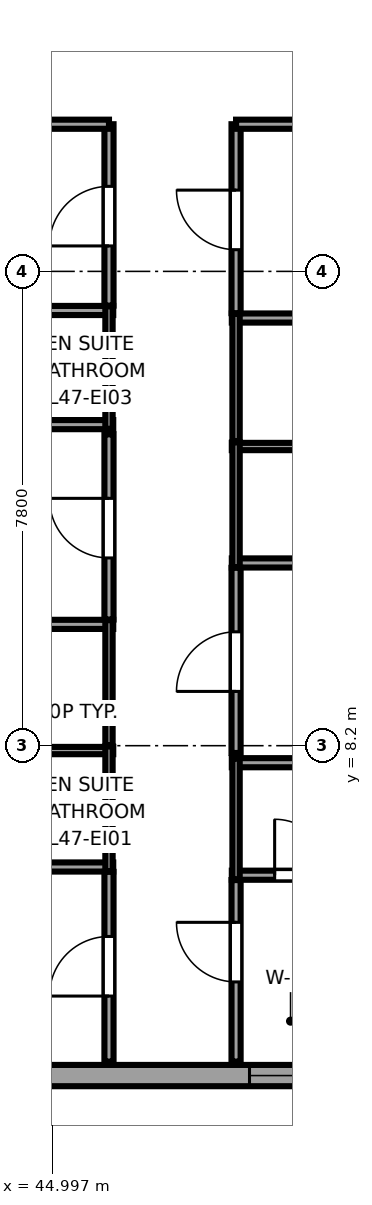
"""IFC4 building model, lengths in metres.
Left out: names, types, materials, properties, quantities, classifications, styles, units other than length and angle.
Written with IfcOpenShell. Run it as: python <this file> out.ifc"""

import sys

from ifc_helpers import new_model, si_unit, direction, frame, frame_2d, origin, place, context, subcontext, project, spatial, rectangle, extrude, source, transform, mapped, element, fill, save


model = new_model("IFC4")
c1 = context("Model", 3, precision=1e-05, world=origin(), true_north=direction((0.0, 1.0)))
c2 = subcontext(c1, "Body", "Model", "MODEL_VIEW")
j1 = project(units=[si_unit("LENGTHUNIT", "METRE"), si_unit("PLANEANGLEUNIT", "RADIAN")], contexts=[c1])
p1 = place(None, origin())
s1 = spatial("IfcSite", under=j1, at=p1, CompositionType="ELEMENT")
p2 = place(p1, origin())
s2 = spatial("IfcBuilding", under=s1, at=p2, CompositionType="ELEMENT")
p3 = place(p2, frame((0.0, 0.0, 179.0)))
s3 = spatial("IfcBuildingStorey", under=s2, at=p3, CompositionType="ELEMENT", Elevation=179.0)
p4 = place(p3, frame((34.375, 2.775, 0.0), z_axis=(0.0, 0.0, 1.0), x_axis=(1.0, 0.0, 0.0)))
e1 = element("IfcWall", 1, at=p4, inside=s3, PredefinedType="SOLIDWALL", context=c2, shape_type="SweptSolid", body=[
    extrude(rectangle(XDim=15.608, YDim=0.35, at=frame_2d((7.804, 0.0))), origin(), (0.0, 0.0, 1.0), 3.25),
])
p5 = place(p4, frame((1.801, 0.0, 0.68)))
e2 = element("IfcOpeningElement", 2, at=p5, cuts=e1, PredefinedType="OPENING", context=c2, shape_type="SweptSolid", body=[
    extrude(rectangle(XDim=2.4, YDim=1.9, at=frame_2d((1.2, 0.95))), frame((0.0, 0.185, 0.0), z_axis=(0.0, -1.0, 0.0), x_axis=(1.0, 0.0, 0.0)), (0.0, 0.0, 1.0), 0.37),
])
p6 = place(p4, frame((13.866, 0.0, 0.58)))
e3 = element("IfcOpeningElement", 3, at=p6, cuts=e1, PredefinedType="OPENING", context=c2, shape_type="SweptSolid", body=[
    extrude(rectangle(XDim=1.35, YDim=1.6, at=frame_2d((0.675, 0.8))), frame((0.0, 0.185, 0.0), z_axis=(0.0, -1.0, 0.0), x_axis=(1.0, 0.0, 0.0)), (0.0, 0.0, 1.0), 0.37),
])
p7 = place(p3, frame((43.41, 6.205, 0.0), z_axis=(0.0, 0.0, 1.0), x_axis=(1.0, 0.0, 0.0)))
e4 = element("IfcWall", 4, at=p7, inside=s3, PredefinedType="PARTITIONING", context=c2, shape_type="SweptSolid", body=[
    extrude(rectangle(XDim=2.59, YDim=0.15, at=frame_2d((1.295, 0.0))), origin(), (0.0, 0.0, 1.0), 3.25),
])
p8 = place(p3, frame((43.41, 8.12, 0.0), z_axis=(0.0, 0.0, 1.0), x_axis=(1.0, 0.0, 0.0)))
e5 = element("IfcWall", 5, at=p8, inside=s3, PredefinedType="PLUMBINGWALL", context=c2, shape_type="SweptSolid", body=[
    extrude(rectangle(XDim=2.59, YDim=0.12, at=frame_2d((1.295, 0.0))), origin(), (0.0, 0.0, 1.0), 2.638),
])
p9 = place(p3, frame((45.93, 6.135, 0.0), z_axis=(0.0, 0.0, 1.0), x_axis=(0.0, 1.0, 0.0)))
e6 = element("IfcWall", 6, at=p9, inside=s3, PredefinedType="PLUMBINGWALL", context=c2, shape_type="SweptSolid", body=[
    extrude(rectangle(XDim=2.055, YDim=0.12, at=frame_2d((1.027, 0.0))), origin(), (0.0, 0.0, 1.0), 3.25),
])
p10 = place(p3, frame((43.41, 10.195, 0.0), z_axis=(0.0, 0.0, 1.0), x_axis=(1.0, 0.0, 0.0)))
e7 = element("IfcWall", 7, at=p10, inside=s3, PredefinedType="PARTITIONING", context=c2, shape_type="SweptSolid", body=[
    extrude(rectangle(XDim=2.59, YDim=0.15, at=frame_2d((1.295, 0.0))), origin(), (0.0, 0.0, 1.0), 3.25),
])
p11 = place(p3, frame((45.93, 8.21, 0.0), z_axis=(0.0, 0.0, 1.0), x_axis=(0.0, 1.0, 0.0)))
e8 = element("IfcWall", 8, at=p11, inside=s3, PredefinedType="PLUMBINGWALL", context=c2, shape_type="SweptSolid", body=[
    extrude(rectangle(XDim=2.055, YDim=0.12, at=frame_2d((1.027, 0.0))), origin(), (0.0, 0.0, 1.0), 3.25),
])
p12 = place(p3, frame((34.65, 13.48, 0.0), z_axis=(0.0, 0.0, 1.0), x_axis=(1.0, 0.0, 0.0)))
e9 = element("IfcWall", 9, at=p12, inside=s3, PredefinedType="PARTITIONING", context=c2, shape_type="SweptSolid", body=[
    extrude(rectangle(XDim=11.35, YDim=0.15, at=frame_2d((5.675, 0.0))), origin(), (0.0, 0.0, 1.0), 3.25),
])
p13 = place(p3, frame((43.41, 15.357, 0.0), z_axis=(0.0, 0.0, 1.0), x_axis=(1.0, 0.0, 0.0)))
e10 = element("IfcWall", 10, at=p13, inside=s3, PredefinedType="PARTITIONING", context=c2, shape_type="SweptSolid", body=[
    extrude(rectangle(XDim=2.59, YDim=0.15, at=frame_2d((1.295, 0.0))), origin(), (0.0, 0.0, 1.0), 3.25),
])
p14 = place(p3, frame((45.93, 13.41, 0.0), z_axis=(0.0, 0.0, 1.0), x_axis=(0.0, 1.0, 0.0)))
e11 = element("IfcWall", 11, at=p14, inside=s3, PredefinedType="PLUMBINGWALL", context=c2, shape_type="SweptSolid", body=[
    extrude(rectangle(XDim=2.017, YDim=0.12, at=frame_2d((1.009, 0.0))), origin(), (0.0, 0.0, 1.0), 3.25),
])
p15 = place(p3, frame((47.95, 6.07, 0.0), z_axis=(0.0, 0.0, 1.0), x_axis=(1.0, 0.0, 0.0)))
e12 = element("IfcWall", 12, at=p15, inside=s3, PredefinedType="PARTITIONING", context=c2, shape_type="SweptSolid", body=[
    extrude(rectangle(XDim=2.329, YDim=0.15, at=frame_2d((1.165, 0.0))), origin(), (0.0, 0.0, 1.0), 3.25),
])
p16 = place(p15, frame((0.705, 0.0, 0.0)))
e13 = element("IfcOpeningElement", 13, at=p16, cuts=e12, PredefinedType="OPENING", context=c2, shape_type="SweptSolid", body=[
    extrude(rectangle(XDim=0.92, YDim=2.01, at=frame_2d((0.46, 1.005))), frame((0.0, 0.085, 0.0), z_axis=(0.0, -1.0, 0.0), x_axis=(1.0, 0.0, 0.0)), (0.0, 0.0, 1.0), 0.17),
])
p17 = place(p3, frame((47.95, 7.92, 0.0), z_axis=(0.0, 0.0, 1.0), x_axis=(1.0, 0.0, 0.0)))
e14 = element("IfcWall", 14, at=p17, inside=s3, PredefinedType="PARTITIONING", context=c2, shape_type="SweptSolid", body=[
    extrude(rectangle(XDim=2.329, YDim=0.15, at=frame_2d((1.165, 0.0))), origin(), (0.0, 0.0, 1.0), 3.25),
])
p18 = place(p3, frame((48.02, 6.0, 0.0), z_axis=(0.0, 0.0, 1.0), x_axis=(0.0, 1.0, 0.0)))
e15 = element("IfcWall", 15, at=p18, inside=s3, PredefinedType="PLUMBINGWALL", context=c2, shape_type="SweptSolid", body=[
    extrude(rectangle(XDim=1.99, YDim=0.12, at=frame_2d((0.995, 0.0))), origin(), (0.0, 0.0, 1.0), 3.25),
])
p19 = place(p3, frame((47.95, 11.205, 0.0), z_axis=(0.0, 0.0, 1.0), x_axis=(1.0, 0.0, 0.0)))
e16 = element("IfcWall", 16, at=p19, inside=s3, PredefinedType="PARTITIONING", context=c2, shape_type="SweptSolid", body=[
    extrude(rectangle(XDim=2.329, YDim=0.15, at=frame_2d((1.165, 0.0))), origin(), (0.0, 0.0, 1.0), 3.25),
])
p20 = place(p3, frame((47.95, 13.12, 0.0), z_axis=(0.0, 0.0, 1.0), x_axis=(1.0, 0.0, 0.0)))
e17 = element("IfcWall", 17, at=p20, inside=s3, PredefinedType="PLUMBINGWALL", context=c2, shape_type="SweptSolid", body=[
    extrude(rectangle(XDim=2.329, YDim=0.12, at=frame_2d((1.165, 0.0))), origin(), (0.0, 0.0, 1.0), 3.25),
])
p21 = place(p3, frame((48.02, 11.135, 0.0), z_axis=(0.0, 0.0, 1.0), x_axis=(0.0, 1.0, 0.0)))
e18 = element("IfcWall", 18, at=p21, inside=s3, PredefinedType="PLUMBINGWALL", context=c2, shape_type="SweptSolid", body=[
    extrude(rectangle(XDim=2.055, YDim=0.12, at=frame_2d((1.027, 0.0))), origin(), (0.0, 0.0, 1.0), 3.25),
])
p22 = place(p3, frame((47.95, 15.233, 0.0), z_axis=(0.0, 0.0, 1.0), x_axis=(1.0, 0.0, 0.0)))
e19 = element("IfcWall", 19, at=p22, inside=s3, PredefinedType="PARTITIONING", context=c2, shape_type="SweptSolid", body=[
    extrude(rectangle(XDim=2.329, YDim=0.15, at=frame_2d((1.165, 0.0))), origin(), (0.0, 0.0, 1.0), 3.25),
])
p23 = place(p3, frame((48.02, 13.21, 0.0), z_axis=(0.0, 0.0, 1.0), x_axis=(0.0, 1.0, 0.0)))
e20 = element("IfcWall", 20, at=p23, inside=s3, PredefinedType="PLUMBINGWALL", context=c2, shape_type="SweptSolid", body=[
    extrude(rectangle(XDim=2.093, YDim=0.12, at=frame_2d((1.046, 0.0))), origin(), (0.0, 0.0, 1.0), 3.25),
])
p24 = place(p3, frame((45.93, 3.005, 0.0), z_axis=(0.0, 0.0, 1.0), x_axis=(0.0, 1.0, 0.0)))
e21 = element("IfcWall", 21, at=p24, inside=s3, PredefinedType="PARTITIONING", context=c2, shape_type="SweptSolid", body=[
    extrude(rectangle(XDim=3.12, YDim=0.15, at=frame_2d((1.56, 0.0))), origin(), (0.0, 0.0, 1.0), 3.25),
])
p25 = place(p24, frame((1.077, 0.0, 0.0)))
e22 = element("IfcOpeningElement", 22, at=p25, cuts=e21, PredefinedType="OPENING", context=c2, shape_type="SweptSolid", body=[
    extrude(rectangle(XDim=0.98, YDim=2.12, at=frame_2d((0.49, 1.06))), frame((0.0, 0.085, 0.0), z_axis=(0.0, -1.0, 0.0), x_axis=(1.0, 0.0, 0.0)), (0.0, 0.0, 1.0), 0.17),
])
p26 = place(p3, frame((45.93, 10.275, 0.0), z_axis=(0.0, 0.0, 1.0), x_axis=(0.0, 1.0, 0.0)))
e23 = element("IfcWall", 23, at=p26, inside=s3, PredefinedType="PARTITIONING", context=c2, shape_type="SweptSolid", body=[
    extrude(rectangle(XDim=3.045, YDim=0.15, at=frame_2d((1.522, 0.0))), origin(), (0.0, 0.0, 1.0), 3.25),
])
p27 = place(p26, frame((1.012, 0.0, 0.0)))
e24 = element("IfcOpeningElement", 24, at=p27, cuts=e23, PredefinedType="OPENING", context=c2, shape_type="SweptSolid", body=[
    extrude(rectangle(XDim=0.98, YDim=2.12, at=frame_2d((0.49, 1.06))), frame((0.0, 0.085, 0.0), z_axis=(0.0, -1.0, 0.0), x_axis=(1.0, 0.0, 0.0)), (0.0, 0.0, 1.0), 0.17),
])
p28 = place(p3, frame((45.93, 15.437, 0.0), z_axis=(0.0, 0.0, 1.0), x_axis=(0.0, 1.0, 0.0)))
e25 = element("IfcWall", 25, at=p28, inside=s3, PredefinedType="PARTITIONING", context=c2, shape_type="SweptSolid", body=[
    extrude(rectangle(XDim=2.983, YDim=0.15, at=frame_2d((1.491, 0.0))), origin(), (0.0, 0.0, 1.0), 3.25),
])
p29 = place(p28, frame((0.981, 0.0, 0.0)))
e26 = element("IfcOpeningElement", 26, at=p29, cuts=e25, PredefinedType="OPENING", context=c2, shape_type="SweptSolid", body=[
    extrude(rectangle(XDim=0.98, YDim=2.12, at=frame_2d((0.49, 1.06))), frame((0.0, 0.085, 0.0), z_axis=(0.0, -1.0, 0.0), x_axis=(1.0, 0.0, 0.0)), (0.0, 0.0, 1.0), 0.17),
])
p30 = place(p3, frame((34.65, 18.42, 0.0), z_axis=(0.0, 0.0, 1.0), x_axis=(1.0, 0.0, 0.0)))
e27 = element("IfcWall", 27, at=p30, inside=s3, PredefinedType="PARTITIONING", context=c2, shape_type="SweptSolid", body=[
    extrude(rectangle(XDim=11.28, YDim=0.15, at=frame_2d((5.64, 0.0))), origin(), (0.0, 0.0, 1.0), 3.25),
])
p31 = place(p3, frame((48.02, 3.005, 0.0), z_axis=(0.0, 0.0, 1.0), x_axis=(0.0, 1.0, 0.0)))
e28 = element("IfcWall", 28, at=p31, inside=s3, PredefinedType="PARTITIONING", context=c2, shape_type="SweptSolid", body=[
    extrude(rectangle(XDim=2.985, YDim=0.15, at=frame_2d((1.493, 0.0))), origin(), (0.0, 0.0, 1.0), 3.25),
])
p32 = place(p31, frame((1.31, 0.0, 0.0)))
e29 = element("IfcOpeningElement", 29, at=p32, cuts=e28, PredefinedType="OPENING", context=c2, shape_type="SweptSolid", body=[
    extrude(rectangle(XDim=0.98, YDim=2.12, at=frame_2d((0.49, 1.06))), frame((0.0, 0.085, 0.0), z_axis=(0.0, -1.0, 0.0), x_axis=(1.0, 0.0, 0.0)), (0.0, 0.0, 1.0), 0.17),
])
p33 = place(p3, frame((48.02, 8.08, 0.0), z_axis=(0.0, 0.0, 1.0), x_axis=(0.0, 1.0, 0.0)))
e30 = element("IfcWall", 30, at=p33, inside=s3, PredefinedType="PARTITIONING", context=c2, shape_type="SweptSolid", body=[
    extrude(rectangle(XDim=3.045, YDim=0.15, at=frame_2d((1.522, 0.0))), origin(), (0.0, 0.0, 1.0), 3.25),
])
p34 = place(p33, frame((1.012, 0.0, 0.0)))
e31 = element("IfcOpeningElement", 31, at=p34, cuts=e30, PredefinedType="OPENING", context=c2, shape_type="SweptSolid", body=[
    extrude(rectangle(XDim=0.98, YDim=2.12, at=frame_2d((0.49, 1.06))), frame((0.0, 0.085, 0.0), z_axis=(0.0, -1.0, 0.0), x_axis=(1.0, 0.0, 0.0)), (0.0, 0.0, 1.0), 0.17),
])
p35 = place(p3, frame((48.02, 15.313, 0.0), z_axis=(0.0, 0.0, 1.0), x_axis=(0.0, 1.0, 0.0)))
e32 = element("IfcWall", 32, at=p35, inside=s3, PredefinedType="PARTITIONING", context=c2, shape_type="SweptSolid", body=[
    extrude(rectangle(XDim=3.107, YDim=0.15, at=frame_2d((1.553, 0.0))), origin(), (0.0, 0.0, 1.0), 3.25),
])
p36 = place(p35, frame((1.043, 0.0, 0.0)))
e33 = element("IfcOpeningElement", 33, at=p36, cuts=e32, PredefinedType="OPENING", context=c2, shape_type="SweptSolid", body=[
    extrude(rectangle(XDim=0.98, YDim=2.12, at=frame_2d((0.49, 1.06))), frame((0.0, 0.085, 0.0), z_axis=(0.0, -1.0, 0.0), x_axis=(1.0, 0.0, 0.0)), (0.0, 0.0, 1.0), 0.17),
])
p37 = place(p3, frame((48.02, 18.42, 0.0), z_axis=(0.0, 0.0, 1.0), x_axis=(1.0, 0.0, 0.0)))
e34 = element("IfcWall", 34, at=p37, inside=s3, PredefinedType="PARTITIONING", context=c2, shape_type="SweptSolid", body=[
    extrude(rectangle(XDim=5.975, YDim=0.15, at=frame_2d((2.988, 0.0))), origin(), (0.0, 0.0, 1.0), 3.25),
])
m1 = source(origin(), c2, "Body", "SweptSolid", [
    extrude(rectangle(XDim=1.35, YDim=1.6, at=frame_2d((0.675, 0.8))), frame((0.0, 0.09, 0.0), z_axis=(0.0, -1.0, 0.0), x_axis=(1.0, 0.0, 0.0)), (0.0, 0.0, 1.0), 0.06),
])
p38 = place(p6, origin())
e35 = element("IfcWindow", 35, at=p38, inside=s3, PartitioningType="SINGLE_PANEL", PredefinedType="WINDOW", context=c2, shape_type="MappedRepresentation", body=[
    mapped(m1, transform((0.0, 0.0, 0.0), x_axis=(1.0, 0.0, 0.0), y_axis=(0.0, 1.0, 0.0), z_axis=(0.0, 0.0, 1.0), scale=1.0)),
])
fill(e3, e35)
m2 = source(origin(), c2, "Body", "SweptSolid", [
    extrude(rectangle(XDim=0.92, YDim=2.01, at=frame_2d((0.46, 1.005))), frame((0.0, 0.025, 0.0), z_axis=(0.0, -1.0, 0.0), x_axis=(1.0, 0.0, 0.0)), (0.0, 0.0, 1.0), 0.05),
])
p39 = place(p16, origin())
e36 = element("IfcDoor", 36, at=p39, inside=s3, OperationType="SINGLE_SWING_LEFT", PredefinedType="DOOR", context=c2, shape_type="MappedRepresentation", body=[
    mapped(m2, transform((0.0, 0.0, 0.0), x_axis=(1.0, 0.0, 0.0), y_axis=(0.0, 1.0, 0.0), z_axis=(0.0, 0.0, 1.0), scale=1.0)),
])
fill(e13, e36)
m3 = source(origin(), c2, "Body", "SweptSolid", [
    extrude(rectangle(XDim=0.98, YDim=2.12, at=frame_2d((0.49, 1.06))), frame((0.0, 0.025, 0.0), z_axis=(0.0, -1.0, 0.0), x_axis=(1.0, 0.0, 0.0)), (0.0, 0.0, 1.0), 0.05),
])
p40 = place(p25, origin())
e37 = element("IfcDoor", 37, at=p40, inside=s3, OperationType="SINGLE_SWING_LEFT", PredefinedType="DOOR", context=c2, shape_type="MappedRepresentation", body=[
    mapped(m3, transform((0.0, 0.0, 0.0), x_axis=(1.0, 0.0, 0.0), y_axis=(0.0, 1.0, 0.0), z_axis=(0.0, 0.0, 1.0), scale=1.0)),
])
fill(e22, e37)
p41 = place(p27, origin())
e38 = element("IfcDoor", 38, at=p41, inside=s3, OperationType="SINGLE_SWING_RIGHT", PredefinedType="DOOR", context=c2, shape_type="MappedRepresentation", body=[
    mapped(m3, transform((0.0, 0.0, 0.0), x_axis=(1.0, 0.0, 0.0), y_axis=(0.0, 1.0, 0.0), z_axis=(0.0, 0.0, 1.0), scale=1.0)),
])
fill(e24, e38)
p42 = place(p29, origin())
e39 = element("IfcDoor", 39, at=p42, inside=s3, OperationType="SINGLE_SWING_LEFT", PredefinedType="DOOR", context=c2, shape_type="MappedRepresentation", body=[
    mapped(m3, transform((0.0, 0.0, 0.0), x_axis=(1.0, 0.0, 0.0), y_axis=(0.0, 1.0, 0.0), z_axis=(0.0, 0.0, 1.0), scale=1.0)),
])
fill(e26, e39)
p43 = place(p32, origin())
e40 = element("IfcDoor", 40, at=p43, inside=s3, OperationType="SINGLE_SWING_RIGHT", PredefinedType="DOOR", context=c2, shape_type="MappedRepresentation", body=[
    mapped(m3, transform((0.0, 0.0, 0.0), x_axis=(1.0, 0.0, 0.0), y_axis=(0.0, 1.0, 0.0), z_axis=(0.0, 0.0, 1.0), scale=1.0)),
])
fill(e29, e40)
p44 = place(p34, origin())
e41 = element("IfcDoor", 41, at=p44, inside=s3, OperationType="SINGLE_SWING_LEFT", PredefinedType="DOOR", context=c2, shape_type="MappedRepresentation", body=[
    mapped(m3, transform((0.0, 0.0, 0.0), x_axis=(1.0, 0.0, 0.0), y_axis=(0.0, 1.0, 0.0), z_axis=(0.0, 0.0, 1.0), scale=1.0)),
])
fill(e31, e41)
p45 = place(p36, origin())
e42 = element("IfcDoor", 42, at=p45, inside=s3, OperationType="SINGLE_SWING_RIGHT", PredefinedType="DOOR", context=c2, shape_type="MappedRepresentation", body=[
    mapped(m3, transform((0.0, 0.0, 0.0), x_axis=(1.0, 0.0, 0.0), y_axis=(0.0, 1.0, 0.0), z_axis=(0.0, 0.0, 1.0), scale=1.0)),
])
fill(e33, e42)
save(model, sys.argv[1])
